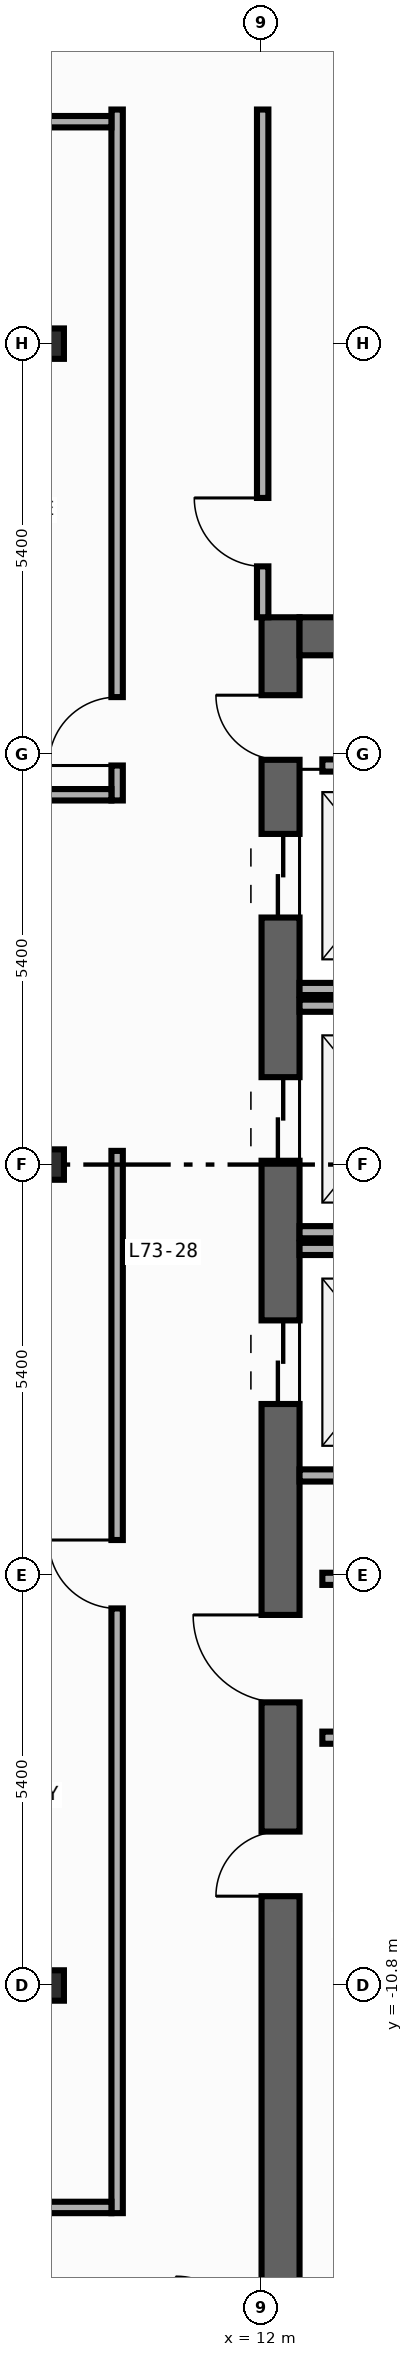
"""IFC4 building model, lengths in metres.
Left out: names, types, materials, properties, quantities, classifications, styles, units other than length and angle.
Written with IfcOpenShell. Run it as: python <this file> out.ifc"""

import sys

from ifc_helpers import new_model, si_unit, direction, frame, frame_2d, origin, origin_2d, place, context, subcontext, project, spatial, rectangle, i_section, extrude, element, fill, save


model = new_model("IFC4")
c1 = context("Model", 3, precision=1e-05, world=origin(), true_north=direction((0.0, 1.0)))
c2 = subcontext(c1, "Body", "Model", "MODEL_VIEW")
j1 = project(units=[si_unit("LENGTHUNIT", "METRE"), si_unit("PLANEANGLEUNIT", "RADIAN")], contexts=[c1])
p1 = place(None, origin())
s1 = spatial("IfcSite", under=j1, at=p1, CompositionType="ELEMENT")
p2 = place(p1, origin())
s2 = spatial("IfcBuilding", under=s1, at=p2, CompositionType="ELEMENT")
p3 = place(p2, frame((0.0, 0.0, 304.2)))
s3 = spatial("IfcBuildingStorey", under=s2, at=p3, CompositionType="ELEMENT", Elevation=304.2)
p4 = place(p3, frame((12.25, -19.8, 0.0), z_axis=(0.0, 0.0, 1.0), x_axis=(0.0, 1.0, 0.0)))
e1 = element("IfcWall", 1, at=p4, inside=s3, PredefinedType="SHEAR", context=c2, shape_type="SweptSolid", body=[
    extrude(rectangle(XDim=27.0, YDim=0.5, at=frame_2d((13.5, 0.0))), origin(), (0.0, 0.0, 1.0), 3.54),
])
p5 = place(p4, frame((23.05, 0.0, 0.0)))
e2 = element("IfcOpeningElement", 2, at=p5, cuts=e1, PredefinedType="OPENING", context=c2, shape_type="SweptSolid", body=[
    extrude(rectangle(XDim=1.1, YDim=2.2, at=frame_2d((0.55, 1.1))), frame((0.0, 0.26, 0.0), z_axis=(0.0, -1.0, 0.0), x_axis=(1.0, 0.0, 0.0)), (0.0, 0.0, 1.0), 0.52),
])
p6 = place(p4, frame((19.85, 0.0, 0.0)))
e3 = element("IfcOpeningElement", 3, at=p6, cuts=e1, PredefinedType="OPENING", context=c2, shape_type="SweptSolid", body=[
    extrude(rectangle(XDim=1.1, YDim=2.2, at=frame_2d((0.55, 1.1))), frame((0.0, 0.26, 0.0), z_axis=(0.0, -1.0, 0.0), x_axis=(1.0, 0.0, 0.0)), (0.0, 0.0, 1.0), 0.52),
])
p7 = place(p4, frame((16.65, 0.0, 0.0)))
e4 = element("IfcOpeningElement", 4, at=p7, cuts=e1, PredefinedType="OPENING", context=c2, shape_type="SweptSolid", body=[
    extrude(rectangle(XDim=1.1, YDim=2.2, at=frame_2d((0.55, 1.1))), frame((0.0, 0.26, 0.0), z_axis=(0.0, -1.0, 0.0), x_axis=(1.0, 0.0, 0.0)), (0.0, 0.0, 1.0), 0.52),
])
p8 = place(p4, frame((10.175, 0.0, 0.0)))
e5 = element("IfcOpeningElement", 5, at=p8, cuts=e1, PredefinedType="OPENING", context=c2, shape_type="SweptSolid", body=[
    extrude(rectangle(XDim=0.85, YDim=2.1, at=frame_2d((0.425, 1.05))), frame((0.0, 0.26, 0.0), z_axis=(0.0, -1.0, 0.0), x_axis=(1.0, 0.0, 0.0)), (0.0, 0.0, 1.0), 0.52),
])
p9 = place(p4, frame((12.725, 0.0, 0.0)))
e6 = element("IfcOpeningElement", 6, at=p9, cuts=e1, PredefinedType="OPENING", context=c2, shape_type="SweptSolid", body=[
    extrude(rectangle(XDim=1.15, YDim=2.2, at=frame_2d((0.575, 1.1))), frame((0.0, 0.26, 0.0), z_axis=(0.0, -1.0, 0.0), x_axis=(1.0, 0.0, 0.0)), (0.0, 0.0, 1.0), 0.52),
])
p10 = place(p4, frame((25.125, 0.0, 0.0)))
e7 = element("IfcOpeningElement", 7, at=p10, cuts=e1, PredefinedType="OPENING", context=c2, shape_type="SweptSolid", body=[
    extrude(rectangle(XDim=0.85, YDim=2.1, at=frame_2d((0.425, 1.05))), frame((0.0, 0.26, 0.0), z_axis=(0.0, -1.0, 0.0), x_axis=(1.0, 0.0, 0.0)), (0.0, 0.0, 1.0), 0.52),
])
p11 = place(p3, frame((12.5, 6.95, 0.0), z_axis=(0.0, 0.0, 1.0), x_axis=(1.0, 0.0, 0.0)))
e8 = element("IfcWall", 8, at=p11, inside=s3, PredefinedType="SHEAR", context=c2, shape_type="SweptSolid", body=[
    extrude(rectangle(XDim=7.4, YDim=0.5, at=frame_2d((3.7, 0.0))), origin(), (0.0, 0.0, 1.0), 3.54),
])
for number, where, z_axis, x_axis in (
    (9, (9.2, -10.8, 0.0), (0.0, 0.0, 1.0), (1.0, 0.0, 0.0)),
    (10, (9.2, 0.0, 0.0), (0.0, 0.0, 1.0), (1.0, 0.0, 0.0)),
    (11, (9.2, 10.8, 0.0), (0.0, 0.0, 1.0), (1.0, 0.0, 0.0)),
):
    element("IfcColumn", number, at=place(p3, frame(where, z_axis=z_axis, x_axis=x_axis)), inside=s3, PredefinedType="COLUMN", context=c2, shape_type="SweptSolid", body=[
        extrude(i_section(OverallWidth=0.4, OverallDepth=0.4, WebThickness=0.013, FlangeThickness=0.021, FilletRadius=0.022, at=origin_2d()), origin(), (0.0, 0.0, 1.0), 3.8),
    ])
for number, where, z_axis, x_axis in (
    (12, (12.5, 2.31, 0.0), (0.0, 0.0, 1.0), (1.0, 0.0, 0.0)),
    (13, (12.5, -0.89, 0.0), (0.0, 0.0, 1.0), (1.0, 0.0, 0.0)),
    (14, (12.5, 2.09, 0.0), (0.0, 0.0, 1.0), (1.0, 0.0, 0.0)),
    (15, (12.5, -4.09, 0.0), (0.0, 0.0, 1.0), (1.0, 0.0, 0.0)),
    (16, (12.5, -1.11, 0.0), (0.0, 0.0, 1.0), (1.0, 0.0, 0.0)),
):
    element("IfcWall", number, at=place(p3, frame(where, z_axis=z_axis, x_axis=x_axis)), inside=s3, PredefinedType="STANDARD", context=c2, shape_type="SweptSolid", body=[
        extrude(rectangle(XDim=2.49, YDim=0.16, at=frame_2d((1.245, 0.0))), origin(), (0.0, 0.0, 1.0), 3.54),
    ])
for number, where, z_axis, x_axis in (
    (17, (12.8, -5.45, 0.0), (0.0, 0.0, 1.0), (1.0, 0.0, 0.0)),
    (18, (12.8, -7.54, 0.0), (0.0, 0.0, 1.0), (1.0, 0.0, 0.0)),
    (19, (12.8, 5.25, 0.0), (0.0, 0.0, 1.0), (1.0, 0.0, 0.0)),
):
    element("IfcWall", number, at=place(p3, frame(where, z_axis=z_axis, x_axis=x_axis)), inside=s3, PredefinedType="STANDARD", context=c2, shape_type="SweptSolid", body=[
        extrude(rectangle(XDim=2.6, YDim=0.16, at=frame_2d((1.3, 0.0))), origin(), (0.0, 0.0, 1.0), 3.54),
    ])
p12 = place(p3, frame((12.015, 7.2, 0.0), z_axis=(0.0, 0.0, 1.0), x_axis=(0.0, 1.0, 0.0)))
e20 = element("IfcWall", 20, at=p12, inside=s3, PredefinedType="PARTITIONING", context=c2, shape_type="SweptSolid", body=[
    extrude(rectangle(XDim=6.68, YDim=0.15, at=frame_2d((3.34, 0.0))), origin(), (0.0, 0.0, 1.0), 3.54),
])
p13 = place(p12, frame((0.67, 0.0, 0.0)))
e21 = element("IfcOpeningElement", 21, at=p13, cuts=e20, PredefinedType="OPENING", context=c2, shape_type="SweptSolid", body=[
    extrude(rectangle(XDim=0.9, YDim=2.15, at=frame_2d((0.45, 1.075))), frame((0.0, 0.085, 0.0), z_axis=(0.0, -1.0, 0.0), x_axis=(1.0, 0.0, 0.0)), (0.0, 0.0, 1.0), 0.17),
])
p14 = place(p3, frame((10.1, 4.79, 0.0), z_axis=(0.0, 0.0, 1.0), x_axis=(0.0, 1.0, 0.0)))
e22 = element("IfcWall", 22, at=p14, inside=s3, PredefinedType="PARTITIONING", context=c2, shape_type="SweptSolid", body=[
    extrude(rectangle(XDim=9.09, YDim=0.15, at=frame_2d((4.545, 0.0))), origin(), (0.0, 0.0, 1.0), 3.54),
])
p15 = place(p14, frame((0.46, 0.0, 0.0)))
e23 = element("IfcOpeningElement", 23, at=p15, cuts=e22, PredefinedType="OPENING", context=c2, shape_type="SweptSolid", body=[
    extrude(rectangle(XDim=0.9, YDim=2.15, at=frame_2d((0.45, 1.075))), frame((0.0, 0.085, 0.0), z_axis=(0.0, -1.0, 0.0), x_axis=(1.0, 0.0, 0.0)), (0.0, 0.0, 1.0), 0.17),
])
p16 = place(p3, frame((10.1, -13.795, 0.0), z_axis=(0.0, 0.0, 1.0), x_axis=(0.0, 1.0, 0.0)))
e24 = element("IfcWall", 24, at=p16, inside=s3, PredefinedType="PARTITIONING", context=c2, shape_type="SweptSolid", body=[
    extrude(rectangle(XDim=13.975, YDim=0.15, at=frame_2d((6.987, 0.0))), origin(), (0.0, 0.0, 1.0), 3.54),
])
p17 = place(p16, frame((7.956, 0.0, 0.0)))
e25 = element("IfcOpeningElement", 25, at=p17, cuts=e24, PredefinedType="OPENING", context=c2, shape_type="SweptSolid", body=[
    extrude(rectangle(XDim=0.9, YDim=2.15, at=frame_2d((0.45, 1.075))), frame((0.0, 0.085, 0.0), z_axis=(0.0, -1.0, 0.0), x_axis=(1.0, 0.0, 0.0)), (0.0, 0.0, 1.0), 0.17),
])
p18 = place(p3, frame((4.97, 4.865, 0.0), z_axis=(0.0, 0.0, 1.0), x_axis=(1.0, 0.0, 0.0)))
e26 = element("IfcWall", 26, at=p18, inside=s3, PredefinedType="PARTITIONING", context=c2, shape_type="SweptSolid", body=[
    extrude(rectangle(XDim=5.055, YDim=0.15, at=frame_2d((2.527, 0.0))), origin(), (0.0, 0.0, 1.0), 3.54),
])
p19 = place(p18, frame((0.46, 0.0, 0.0)))
e27 = element("IfcOpeningElement", 27, at=p19, cuts=e26, PredefinedType="OPENING", context=c2, shape_type="SweptSolid", body=[
    extrude(rectangle(XDim=0.9, YDim=2.15, at=frame_2d((0.45, 1.075))), frame((0.0, 0.085, 0.0), z_axis=(0.0, -1.0, 0.0), x_axis=(1.0, 0.0, 0.0)), (0.0, 0.0, 1.0), 0.17),
])
p20 = place(p3, frame((4.97, 13.72, 0.0), z_axis=(0.0, 0.0, 1.0), x_axis=(1.0, 0.0, 0.0)))
e28 = element("IfcWall", 28, at=p20, inside=s3, PredefinedType="PARTITIONING", context=c2, shape_type="SweptSolid", body=[
    extrude(rectangle(XDim=5.055, YDim=0.15, at=frame_2d((2.527, 0.0))), origin(), (0.0, 0.0, 1.0), 3.54),
])
p21 = place(p20, frame((0.46, 0.0, 0.0)))
e29 = element("IfcOpeningElement", 29, at=p21, cuts=e28, PredefinedType="OPENING", context=c2, shape_type="SweptSolid", body=[
    extrude(rectangle(XDim=0.9, YDim=2.15, at=frame_2d((0.45, 1.075))), frame((0.0, 0.085, 0.0), z_axis=(0.0, -1.0, 0.0), x_axis=(1.0, 0.0, 0.0)), (0.0, 0.0, 1.0), 0.17),
])
p22 = place(p3, frame((5.14, -13.72, 0.0), z_axis=(0.0, 0.0, 1.0), x_axis=(1.0, 0.0, 0.0)))
e30 = element("IfcWall", 30, at=p22, inside=s3, PredefinedType="PARTITIONING", context=c2, shape_type="SweptSolid", body=[
    extrude(rectangle(XDim=4.885, YDim=0.15, at=frame_2d((2.442, 0.0))), origin(), (0.0, 0.0, 1.0), 3.54),
])
p23 = place(p22, frame((0.46, 0.0, 0.0)))
e31 = element("IfcOpeningElement", 31, at=p23, cuts=e30, PredefinedType="OPENING", context=c2, shape_type="SweptSolid", body=[
    extrude(rectangle(XDim=0.9, YDim=2.15, at=frame_2d((0.45, 1.075))), frame((0.0, 0.085, 0.0), z_axis=(0.0, -1.0, 0.0), x_axis=(1.0, 0.0, 0.0)), (0.0, 0.0, 1.0), 0.17),
])
p24 = place(p5, origin())
e32 = element("IfcDoor", 32, at=p24, inside=s3, OperationType="DOUBLE_DOOR_SLIDING", PredefinedType="DOOR", context=c2, shape_type="SweptSolid", body=[
    extrude(rectangle(XDim=1.1, YDim=2.2, at=frame_2d((0.55, 1.1))), frame((0.0, 0.025, 0.0), z_axis=(0.0, -1.0, 0.0), x_axis=(1.0, 0.0, 0.0)), (0.0, 0.0, 1.0), 0.05),
])
fill(e2, e32)
p25 = place(p6, origin())
e33 = element("IfcDoor", 33, at=p25, inside=s3, OperationType="DOUBLE_DOOR_SLIDING", PredefinedType="DOOR", context=c2, shape_type="SweptSolid", body=[
    extrude(rectangle(XDim=1.1, YDim=2.2, at=frame_2d((0.55, 1.1))), frame((0.0, 0.025, 0.0), z_axis=(0.0, -1.0, 0.0), x_axis=(1.0, 0.0, 0.0)), (0.0, 0.0, 1.0), 0.05),
])
fill(e3, e33)
p26 = place(p7, origin())
e34 = element("IfcDoor", 34, at=p26, inside=s3, OperationType="DOUBLE_DOOR_SLIDING", PredefinedType="DOOR", context=c2, shape_type="SweptSolid", body=[
    extrude(rectangle(XDim=1.1, YDim=2.2, at=frame_2d((0.55, 1.1))), frame((0.0, 0.025, 0.0), z_axis=(0.0, -1.0, 0.0), x_axis=(1.0, 0.0, 0.0)), (0.0, 0.0, 1.0), 0.05),
])
fill(e4, e34)
p27 = place(p8, origin())
e35 = element("IfcDoor", 35, at=p27, inside=s3, OperationType="SINGLE_SWING_LEFT", PredefinedType="DOOR", context=c2, shape_type="SweptSolid", body=[
    extrude(rectangle(XDim=0.85, YDim=2.1, at=frame_2d((0.425, 1.05))), frame((0.0, 0.025, 0.0), z_axis=(0.0, -1.0, 0.0), x_axis=(1.0, 0.0, 0.0)), (0.0, 0.0, 1.0), 0.05),
])
fill(e5, e35)
p28 = place(p9, origin())
e36 = element("IfcDoor", 36, at=p28, inside=s3, OperationType="SINGLE_SWING_RIGHT", PredefinedType="DOOR", context=c2, shape_type="SweptSolid", body=[
    extrude(rectangle(XDim=1.15, YDim=2.2, at=frame_2d((0.575, 1.1))), frame((0.0, 0.025, 0.0), z_axis=(0.0, -1.0, 0.0), x_axis=(1.0, 0.0, 0.0)), (0.0, 0.0, 1.0), 0.05),
])
fill(e6, e36)
p29 = place(p10, origin())
e37 = element("IfcDoor", 37, at=p29, inside=s3, OperationType="SINGLE_SWING_RIGHT", PredefinedType="DOOR", context=c2, shape_type="SweptSolid", body=[
    extrude(rectangle(XDim=0.85, YDim=2.1, at=frame_2d((0.425, 1.05))), frame((0.0, 0.025, 0.0), z_axis=(0.0, -1.0, 0.0), x_axis=(1.0, 0.0, 0.0)), (0.0, 0.0, 1.0), 0.05),
])
fill(e7, e37)
p30 = place(p13, origin())
e38 = element("IfcDoor", 38, at=p30, inside=s3, OperationType="SINGLE_SWING_RIGHT", PredefinedType="DOOR", context=c2, shape_type="SweptSolid", body=[
    extrude(rectangle(XDim=0.9, YDim=2.15, at=frame_2d((0.45, 1.075))), frame((0.0, 0.025, 0.0), z_axis=(0.0, -1.0, 0.0), x_axis=(1.0, 0.0, 0.0)), (0.0, 0.0, 1.0), 0.05),
])
fill(e21, e38)
p31 = place(p15, origin())
e39 = element("IfcDoor", 39, at=p31, inside=s3, OperationType="SINGLE_SWING_LEFT", PredefinedType="DOOR", context=c2, shape_type="SweptSolid", body=[
    extrude(rectangle(XDim=0.9, YDim=2.15, at=frame_2d((0.45, 1.075))), frame((0.0, 0.025, 0.0), z_axis=(0.0, -1.0, 0.0), x_axis=(1.0, 0.0, 0.0)), (0.0, 0.0, 1.0), 0.05),
])
fill(e23, e39)
p32 = place(p17, origin())
e40 = element("IfcDoor", 40, at=p32, inside=s3, OperationType="SINGLE_SWING_RIGHT", PredefinedType="DOOR", context=c2, shape_type="SweptSolid", body=[
    extrude(rectangle(XDim=0.9, YDim=2.15, at=frame_2d((0.45, 1.075))), frame((0.0, 0.025, 0.0), z_axis=(0.0, -1.0, 0.0), x_axis=(1.0, 0.0, 0.0)), (0.0, 0.0, 1.0), 0.05),
])
fill(e25, e40)
save(model, sys.argv[1])
